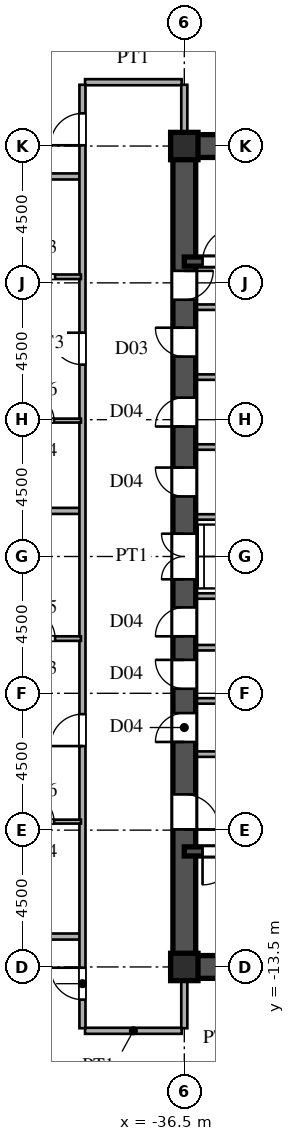
"""IFC4 building model, lengths in metres.
Left out: names, types, materials, properties, quantities, classifications, styles, units other than length and angle.
Written with IfcOpenShell. Run it as: python <this file> out.ifc"""

import sys

from ifc_helpers import new_model, si_unit, direction, frame, frame_2d, origin, origin_2d, place, context, subcontext, project, spatial, rectangle, i_section, extrude, source, transform, mapped, element, fill, save


model = new_model("IFC4")
c1 = context("Model", 3, precision=1e-05, world=origin(), true_north=direction((0.0, 1.0)))
c2 = subcontext(c1, "Body", "Model", "MODEL_VIEW")
j1 = project(units=[si_unit("LENGTHUNIT", "METRE"), si_unit("PLANEANGLEUNIT", "RADIAN")], contexts=[c1])
p1 = place(None, origin())
s1 = spatial("IfcSite", under=j1, at=p1, CompositionType="ELEMENT")
p2 = place(p1, origin())
s2 = spatial("IfcBuilding", under=s1, at=p2, CompositionType="ELEMENT")
p3 = place(p2, frame((0.0, 0.0, 54.9)))
s3 = spatial("IfcBuildingStorey", under=s2, at=p3, CompositionType="ELEMENT", Elevation=54.9)
m1 = source(origin(), c2, "Body", "SweptSolid", [
    extrude(i_section(OverallWidth=0.9, OverallDepth=0.9, WebThickness=0.036, FlangeThickness=0.055, at=origin_2d()), origin(), (0.0, 0.0, 1.0), 3.6),
])
for number, where, z_axis, x_axis in (
    (1, (-36.5, -13.5, 0.0), (0.0, 0.0, 1.0), (1.0, 0.0, 0.0)),
    (2, (-36.5, 13.5, 0.0), (0.0, 0.0, 1.0), (1.0, 0.0, 0.0)),
):
    element("IfcColumn", number, at=place(p3, frame(where, z_axis=z_axis, x_axis=x_axis)), inside=s3, PredefinedType="COLUMN", context=c2, shape_type="MappedRepresentation", body=[
        mapped(m1, transform((0.0, 0.0, 0.0), scale=1.0)),
    ])
for number, where, z_axis, x_axis in (
    (3, (-36.5, -13.5, 0.0), (0.0, 0.0, 1.0), (1.0, 0.0, 0.0)),
    (4, (-36.5, 13.5, 0.0), (0.0, 0.0, 1.0), (1.0, 0.0, 0.0)),
):
    element("IfcWall", number, at=place(p3, frame(where, z_axis=z_axis, x_axis=x_axis)), inside=s3, PredefinedType="SHEAR", context=c2, shape_type="SweptSolid", body=[
        extrude(rectangle(XDim=9.0, YDim=0.75, at=frame_2d((4.5, 0.0))), origin(), (0.0, 0.0, 1.0), 3.38),
    ])
p4 = place(p3, frame((-36.5, -13.65, 0.0), z_axis=(0.0, 0.0, 1.0), x_axis=(0.0, 1.0, 0.0)))
e5 = element("IfcWall", 5, at=p4, inside=s3, PredefinedType="SHEAR", context=c2, shape_type="SweptSolid", body=[
    extrude(rectangle(XDim=7.15, YDim=0.75, at=frame_2d((3.575, 0.0))), origin(), (0.0, 0.0, 1.0), 3.38),
])
p5 = place(p4, frame((4.675, 0.0, 0.0)))
e6 = element("IfcOpeningElement", 6, at=p5, cuts=e5, PredefinedType="OPENING", context=c2, shape_type="SweptSolid", body=[
    extrude(rectangle(XDim=1.15, YDim=2.2, at=frame_2d((0.575, 1.1))), frame((0.0, 0.385, 0.0), z_axis=(0.0, -1.0, 0.0), x_axis=(1.0, 0.0, 0.0)), (0.0, 0.0, 1.0), 0.77),
])
p6 = place(p3, frame((-36.5, -1.3, 0.0), z_axis=(0.0, 0.0, 1.0), x_axis=(0.0, 1.0, 0.0)))
e7 = element("IfcWall", 7, at=p6, inside=s3, PredefinedType="SHEAR", context=c2, shape_type="SweptSolid", body=[
    extrude(rectangle(XDim=2.6, YDim=0.75, at=frame_2d((1.3, 0.0))), origin(), (0.0, 0.0, 1.0), 3.38),
])
p7 = place(p6, frame((0.55, 0.0, 0.0)))
e8 = element("IfcOpeningElement", 8, at=p7, cuts=e7, PredefinedType="OPENING", context=c2, shape_type="SweptSolid", body=[
    extrude(rectangle(XDim=1.5, YDim=2.3, at=frame_2d((0.75, 1.15))), frame((0.0, 0.385, 0.0), z_axis=(0.0, -1.0, 0.0), x_axis=(1.0, 0.0, 0.0)), (0.0, 0.0, 1.0), 0.77),
])
p8 = place(p3, frame((-36.5, 8.2, 0.0), z_axis=(0.0, 0.0, 1.0), x_axis=(0.0, 1.0, 0.0)))
e9 = element("IfcWall", 9, at=p8, inside=s3, PredefinedType="SHEAR", context=c2, shape_type="SweptSolid", body=[
    extrude(rectangle(XDim=5.45, YDim=0.75, at=frame_2d((2.725, 0.0))), origin(), (0.0, 0.0, 1.0), 3.38),
])
p9 = place(p8, frame((0.245, 0.0, 0.0)))
e10 = element("IfcOpeningElement", 10, at=p9, cuts=e9, PredefinedType="OPENING", context=c2, shape_type="SweptSolid", body=[
    extrude(rectangle(XDim=0.95, YDim=2.15, at=frame_2d((0.475, 1.075))), frame((0.0, 0.385, 0.0), z_axis=(0.0, -1.0, 0.0), x_axis=(1.0, 0.0, 0.0)), (0.0, 0.0, 1.0), 0.77),
])
p10 = place(p3, frame((-36.5, -6.5, 0.0), z_axis=(0.0, 0.0, 1.0), x_axis=(0.0, 1.0, 0.0)))
e11 = element("IfcWall", 11, at=p10, inside=s3, PredefinedType="SHEAR", context=c2, shape_type="SweptSolid", body=[
    extrude(rectangle(XDim=1.75, YDim=0.75, at=frame_2d((0.875, 0.0))), origin(), (0.0, 0.0, 1.0), 3.38),
])
p11 = place(p10, frame((0.4, 0.0, 0.0)))
e12 = element("IfcOpeningElement", 12, at=p11, cuts=e11, PredefinedType="OPENING", context=c2, shape_type="SweptSolid", body=[
    extrude(rectangle(XDim=0.95, YDim=2.15, at=frame_2d((0.475, 1.075))), frame((0.0, 0.385, 0.0), z_axis=(0.0, -1.0, 0.0), x_axis=(1.0, 0.0, 0.0)), (0.0, 0.0, 1.0), 0.77),
])
p12 = place(p3, frame((-36.5, -4.75, 0.0), z_axis=(0.0, 0.0, 1.0), x_axis=(0.0, 1.0, 0.0)))
e13 = element("IfcWall", 13, at=p12, inside=s3, PredefinedType="SHEAR", context=c2, shape_type="SweptSolid", body=[
    extrude(rectangle(XDim=1.75, YDim=0.75, at=frame_2d((0.875, 0.0))), origin(), (0.0, 0.0, 1.0), 3.38),
])
p13 = place(p12, frame((0.4, 0.0, 0.0)))
e14 = element("IfcOpeningElement", 14, at=p13, cuts=e13, PredefinedType="OPENING", context=c2, shape_type="SweptSolid", body=[
    extrude(rectangle(XDim=0.95, YDim=2.15, at=frame_2d((0.475, 1.075))), frame((0.0, 0.385, 0.0), z_axis=(0.0, -1.0, 0.0), x_axis=(1.0, 0.0, 0.0)), (0.0, 0.0, 1.0), 0.77),
])
p14 = place(p3, frame((-36.5, -3.0, 0.0), z_axis=(0.0, 0.0, 1.0), x_axis=(0.0, 1.0, 0.0)))
e15 = element("IfcWall", 15, at=p14, inside=s3, PredefinedType="SHEAR", context=c2, shape_type="SweptSolid", body=[
    extrude(rectangle(XDim=1.7, YDim=0.75, at=frame_2d((0.85, 0.0))), origin(), (0.0, 0.0, 1.0), 3.38),
])
p15 = place(p14, frame((0.375, 0.0, 0.0)))
e16 = element("IfcOpeningElement", 16, at=p15, cuts=e15, PredefinedType="OPENING", context=c2, shape_type="SweptSolid", body=[
    extrude(rectangle(XDim=0.95, YDim=2.15, at=frame_2d((0.475, 1.075))), frame((0.0, 0.385, 0.0), z_axis=(0.0, -1.0, 0.0), x_axis=(1.0, 0.0, 0.0)), (0.0, 0.0, 1.0), 0.77),
])
p16 = place(p3, frame((-36.5, 1.3, 0.0), z_axis=(0.0, 0.0, 1.0), x_axis=(0.0, 1.0, 0.0)))
e17 = element("IfcWall", 17, at=p16, inside=s3, PredefinedType="SHEAR", context=c2, shape_type="SweptSolid", body=[
    extrude(rectangle(XDim=2.3, YDim=0.75, at=frame_2d((1.15, 0.0))), origin(), (0.0, 0.0, 1.0), 3.38),
])
p17 = place(p16, frame((0.675, 0.0, 0.0)))
e18 = element("IfcOpeningElement", 18, at=p17, cuts=e17, PredefinedType="OPENING", context=c2, shape_type="SweptSolid", body=[
    extrude(rectangle(XDim=0.95, YDim=2.15, at=frame_2d((0.475, 1.075))), frame((0.0, 0.385, 0.0), z_axis=(0.0, -1.0, 0.0), x_axis=(1.0, 0.0, 0.0)), (0.0, 0.0, 1.0), 0.77),
])
p18 = place(p3, frame((-36.5, 3.6, 0.0), z_axis=(0.0, 0.0, 1.0), x_axis=(0.0, 1.0, 0.0)))
e19 = element("IfcWall", 19, at=p18, inside=s3, PredefinedType="SHEAR", context=c2, shape_type="SweptSolid", body=[
    extrude(rectangle(XDim=2.3, YDim=0.75, at=frame_2d((1.15, 0.0))), origin(), (0.0, 0.0, 1.0), 3.38),
])
p19 = place(p18, frame((0.675, 0.0, 0.0)))
e20 = element("IfcOpeningElement", 20, at=p19, cuts=e19, PredefinedType="OPENING", context=c2, shape_type="SweptSolid", body=[
    extrude(rectangle(XDim=0.95, YDim=2.15, at=frame_2d((0.475, 1.075))), frame((0.0, 0.385, 0.0), z_axis=(0.0, -1.0, 0.0), x_axis=(1.0, 0.0, 0.0)), (0.0, 0.0, 1.0), 0.77),
])
p20 = place(p3, frame((-36.5, 5.9, 0.0), z_axis=(0.0, 0.0, 1.0), x_axis=(0.0, 1.0, 0.0)))
e21 = element("IfcWall", 21, at=p20, inside=s3, PredefinedType="SHEAR", context=c2, shape_type="SweptSolid", body=[
    extrude(rectangle(XDim=2.3, YDim=0.75, at=frame_2d((1.15, 0.0))), origin(), (0.0, 0.0, 1.0), 3.38),
])
p21 = place(p20, frame((0.675, 0.0, 0.0)))
e22 = element("IfcOpeningElement", 22, at=p21, cuts=e21, PredefinedType="OPENING", context=c2, shape_type="SweptSolid", body=[
    extrude(rectangle(XDim=0.95, YDim=2.15, at=frame_2d((0.475, 1.075))), frame((0.0, 0.385, 0.0), z_axis=(0.0, -1.0, 0.0), x_axis=(1.0, 0.0, 0.0)), (0.0, 0.0, 1.0), 0.77),
])
p22 = place(p3, frame((-36.5, -9.7, 0.0), z_axis=(0.0, 0.0, 1.0), x_axis=(1.0, 0.0, 0.0)))
e23 = element("IfcWall", 23, at=p22, inside=s3, PredefinedType="SHEAR", context=c2, shape_type="SweptSolid", body=[
    extrude(rectangle(XDim=9.0, YDim=0.3, at=frame_2d((4.5, 0.0))), origin(), (0.0, 0.0, 1.0), 3.38),
])
p23 = place(p22, frame((0.6, 0.0, 0.0)))
e24 = element("IfcOpeningElement", 24, at=p23, cuts=e23, PredefinedType="OPENING", context=c2, shape_type="SweptSolid", body=[
    extrude(rectangle(XDim=1.1, YDim=2.2, at=frame_2d((0.55, 1.1))), frame((0.0, 0.16, 0.0), z_axis=(0.0, -1.0, 0.0), x_axis=(1.0, 0.0, 0.0)), (0.0, 0.0, 1.0), 0.32),
])
p24 = place(p3, frame((-36.5, 9.7, 0.0), z_axis=(0.0, 0.0, 1.0), x_axis=(1.0, 0.0, 0.0)))
e25 = element("IfcWall", 25, at=p24, inside=s3, PredefinedType="SHEAR", context=c2, shape_type="SweptSolid", body=[
    extrude(rectangle(XDim=9.0, YDim=0.3, at=frame_2d((4.5, 0.0))), origin(), (0.0, 0.0, 1.0), 3.38),
])
p25 = place(p24, frame((0.6, 0.0, 0.0)))
e26 = element("IfcOpeningElement", 26, at=p25, cuts=e25, PredefinedType="OPENING", context=c2, shape_type="SweptSolid", body=[
    extrude(rectangle(XDim=1.1, YDim=2.2, at=frame_2d((0.55, 1.1))), frame((0.0, 0.16, 0.0), z_axis=(0.0, -1.0, 0.0), x_axis=(1.0, 0.0, 0.0)), (0.0, 0.0, 1.0), 0.32),
])
for number, where, z_axis, x_axis in (
    (27, (-36.15, -6.5, 0.0), (0.0, 0.0, 1.0), (1.0, 0.0, 0.0)),
    (28, (-36.15, 8.2, 0.0), (0.0, 0.0, 1.0), (1.0, 0.0, 0.0)),
):
    element("IfcWall", number, at=place(p3, frame(where, z_axis=z_axis, x_axis=x_axis)), inside=s3, PredefinedType="PARTITIONING", context=c2, shape_type="SweptSolid", body=[
        extrude(rectangle(XDim=5.7, YDim=0.18, at=frame_2d((2.85, 0.0))), origin(), (0.0, 0.0, 1.0), 3.38),
    ])
for number, where, z_axis, x_axis in (
    (29, (-36.15, -1.3, 0.0), (0.0, 0.0, 1.0), (1.0, 0.0, 0.0)),
    (30, (-36.15, 1.3, 0.0), (0.0, 0.0, 1.0), (1.0, 0.0, 0.0)),
    (31, (-36.15, -4.75, 0.0), (0.0, 0.0, 1.0), (1.0, 0.0, 0.0)),
    (32, (-36.15, -3.0, 0.0), (0.0, 0.0, 1.0), (1.0, 0.0, 0.0)),
    (33, (-36.15, 3.6, 0.0), (0.0, 0.0, 1.0), (1.0, 0.0, 0.0)),
    (34, (-36.15, 5.9, 0.0), (0.0, 0.0, 1.0), (1.0, 0.0, 0.0)),
):
    element("IfcWall", number, at=place(p3, frame(where, z_axis=z_axis, x_axis=x_axis)), inside=s3, PredefinedType="PARTITIONING", context=c2, shape_type="SweptSolid", body=[
        extrude(rectangle(XDim=2.95, YDim=0.18, at=frame_2d((1.475, 0.0))), origin(), (0.0, 0.0, 1.0), 3.38),
    ])
p26 = place(p3, frame((-39.765, -15.6, 0.0), z_axis=(0.0, 0.0, 1.0), x_axis=(1.0, 0.0, 0.0)))
e35 = element("IfcWall", 35, at=p26, inside=s3, PredefinedType="PARTITIONING", context=c2, shape_type="SweptSolid", body=[
    extrude(rectangle(XDim=3.18, YDim=0.2, at=frame_2d((1.59, 0.0))), origin(), (0.0, 0.0, 1.0), 3.38),
])
p27 = place(p3, frame((-66.337, -12.5, 0.0), z_axis=(0.0, 0.0, 1.0), x_axis=(1.0, 0.0, 0.0)))
e36 = element("IfcWall", 36, at=p27, inside=s3, PredefinedType="PARTITIONING", context=c2, shape_type="SweptSolid", body=[
    extrude(rectangle(XDim=26.407, YDim=0.2, at=frame_2d((13.204, 0.0))), origin(), (0.0, 0.0, 1.0), 3.38),
])
p28 = place(p3, frame((-42.55, -8.72, 0.0), z_axis=(0.0, 0.0, 1.0), x_axis=(1.0, 0.0, 0.0)))
e37 = element("IfcWall", 37, at=p28, inside=s3, PredefinedType="PARTITIONING", context=c2, shape_type="SweptSolid", body=[
    extrude(rectangle(XDim=2.65, YDim=0.13, at=frame_2d((1.325, 0.0))), origin(), (0.0, 0.0, 1.0), 3.38),
])
p29 = place(p28, frame((0.885, 0.0, 0.0)))
e38 = element("IfcOpeningElement", 38, at=p29, cuts=e37, PredefinedType="OPENING", context=c2, shape_type="SweptSolid", body=[
    extrude(rectangle(XDim=0.88, YDim=2.1, at=frame_2d((0.44, 1.05))), frame((0.0, 0.075, 0.0), z_axis=(0.0, -1.0, 0.0), x_axis=(1.0, 0.0, 0.0)), (0.0, 0.0, 1.0), 0.15),
])
p30 = place(p3, frame((-42.55, -2.7, 0.0), z_axis=(0.0, 0.0, 1.0), x_axis=(1.0, 0.0, 0.0)))
e39 = element("IfcWall", 39, at=p30, inside=s3, PredefinedType="PARTITIONING", context=c2, shape_type="SweptSolid", body=[
    extrude(rectangle(XDim=2.65, YDim=0.15, at=frame_2d((1.325, 0.0))), origin(), (0.0, 0.0, 1.0), 3.38),
])
p31 = place(p30, frame((0.85, 0.0, 0.0)))
e40 = element("IfcOpeningElement", 40, at=p31, cuts=e39, PredefinedType="OPENING", context=c2, shape_type="SweptSolid", body=[
    extrude(rectangle(XDim=0.95, YDim=2.15, at=frame_2d((0.475, 1.075))), frame((0.0, 0.085, 0.0), z_axis=(0.0, -1.0, 0.0), x_axis=(1.0, 0.0, 0.0)), (0.0, 0.0, 1.0), 0.17),
])
p32 = place(p3, frame((-72.505, 1.5, 0.0), z_axis=(0.0, 0.0, 1.0), x_axis=(1.0, 0.0, 0.0)))
e41 = element("IfcWall", 41, at=p32, inside=s3, PredefinedType="PARTITIONING", context=c2, shape_type="SweptSolid", body=[
    extrude(rectangle(XDim=32.575, YDim=0.2, at=frame_2d((16.288, 0.0))), origin(), (0.0, 0.0, 1.0), 3.38),
])
p33 = place(p3, frame((-42.55, 4.47, 0.0), z_axis=(0.0, 0.0, 1.0), x_axis=(1.0, 0.0, 0.0)))
e42 = element("IfcWall", 42, at=p33, inside=s3, PredefinedType="PARTITIONING", context=c2, shape_type="SweptSolid", body=[
    extrude(rectangle(XDim=2.65, YDim=0.13, at=frame_2d((1.325, 0.0))), origin(), (0.0, 0.0, 1.0), 2.68),
])
p34 = place(p33, frame((0.885, 0.0, 0.0)))
e43 = element("IfcOpeningElement", 43, at=p34, cuts=e42, PredefinedType="OPENING", context=c2, shape_type="SweptSolid", body=[
    extrude(rectangle(XDim=0.88, YDim=2.1, at=frame_2d((0.44, 1.05))), frame((0.0, 0.075, 0.0), z_axis=(0.0, -1.0, 0.0), x_axis=(1.0, 0.0, 0.0)), (0.0, 0.0, 1.0), 0.15),
])
p35 = place(p3, frame((-42.55, 9.2, 0.0), z_axis=(0.0, 0.0, 1.0), x_axis=(1.0, 0.0, 0.0)))
e44 = element("IfcWall", 44, at=p35, inside=s3, PredefinedType="PARTITIONING", context=c2, shape_type="SweptSolid", body=[
    extrude(rectangle(XDim=2.65, YDim=0.15, at=frame_2d((1.325, 0.0))), origin(), (0.0, 0.0, 1.0), 3.38),
])
p36 = place(p35, frame((0.85, 0.0, 0.0)))
e45 = element("IfcOpeningElement", 45, at=p36, cuts=e44, PredefinedType="OPENING", context=c2, shape_type="SweptSolid", body=[
    extrude(rectangle(XDim=0.95, YDim=2.15, at=frame_2d((0.475, 1.075))), frame((0.0, 0.085, 0.0), z_axis=(0.0, -1.0, 0.0), x_axis=(1.0, 0.0, 0.0)), (0.0, 0.0, 1.0), 0.17),
])
p37 = place(p3, frame((-66.337, 12.5, 0.0), z_axis=(0.0, 0.0, 1.0), x_axis=(1.0, 0.0, 0.0)))
e46 = element("IfcWall", 46, at=p37, inside=s3, PredefinedType="PARTITIONING", context=c2, shape_type="SweptSolid", body=[
    extrude(rectangle(XDim=26.407, YDim=0.2, at=frame_2d((13.204, 0.0))), origin(), (0.0, 0.0, 1.0), 3.38),
])
p38 = place(p3, frame((-39.765, 15.6, 0.0), z_axis=(0.0, 0.0, 1.0), x_axis=(1.0, 0.0, 0.0)))
e47 = element("IfcWall", 47, at=p38, inside=s3, PredefinedType="PARTITIONING", context=c2, shape_type="SweptSolid", body=[
    extrude(rectangle(XDim=3.18, YDim=0.2, at=frame_2d((1.59, 0.0))), origin(), (0.0, 0.0, 1.0), 3.38),
])
p39 = place(p3, frame((-39.85, -15.515, 0.0), z_axis=(0.0, 0.0, 1.0), x_axis=(0.0, 1.0, 0.0)))
e48 = element("IfcWall", 48, at=p39, inside=s3, PredefinedType="PARTITIONING", context=c2, shape_type="SweptSolid", body=[
    extrude(rectangle(XDim=31.03, YDim=0.2, at=frame_2d((15.515, 0.0))), origin(), (0.0, 0.0, 1.0), 3.38),
])
p40 = place(p39, frame((0.94, 0.0, 0.0)))
e49 = element("IfcOpeningElement", 49, at=p40, cuts=e48, PredefinedType="OPENING", context=c2, shape_type="SweptSolid", body=[
    extrude(rectangle(XDim=1.05, YDim=2.25, at=frame_2d((0.525, 1.125))), frame((0.0, 0.11, 0.0), z_axis=(0.0, -1.0, 0.0), x_axis=(1.0, 0.0, 0.0)), (0.0, 0.0, 1.0), 0.22),
])
p41 = place(p39, frame((9.28, 0.0, 0.0)))
e50 = element("IfcOpeningElement", 50, at=p41, cuts=e48, PredefinedType="OPENING", context=c2, shape_type="SweptSolid", body=[
    extrude(rectangle(XDim=1.05, YDim=2.25, at=frame_2d((0.525, 1.125))), frame((0.0, 0.11, 0.0), z_axis=(0.0, -1.0, 0.0), x_axis=(1.0, 0.0, 0.0)), (0.0, 0.0, 1.0), 0.22),
])
p42 = place(p39, frame((21.825, 0.0, 0.0)))
e51 = element("IfcOpeningElement", 51, at=p42, cuts=e48, PredefinedType="OPENING", context=c2, shape_type="SweptSolid", body=[
    extrude(rectangle(XDim=1.05, YDim=2.25, at=frame_2d((0.525, 1.125))), frame((0.0, 0.11, 0.0), z_axis=(0.0, -1.0, 0.0), x_axis=(1.0, 0.0, 0.0)), (0.0, 0.0, 1.0), 0.22),
])
p43 = place(p39, frame((29.04, 0.0, 0.0)))
e52 = element("IfcOpeningElement", 52, at=p43, cuts=e48, PredefinedType="OPENING", context=c2, shape_type="SweptSolid", body=[
    extrude(rectangle(XDim=1.05, YDim=2.25, at=frame_2d((0.525, 1.125))), frame((0.0, 0.11, 0.0), z_axis=(0.0, -1.0, 0.0), x_axis=(1.0, 0.0, 0.0)), (0.0, 0.0, 1.0), 0.22),
])
for number, where, z_axis, x_axis in (
    (53, (-36.5, -15.515, 0.0), (0.0, 0.0, 1.0), (0.0, 1.0, 0.0)),
    (54, (-36.5, 13.88, 0.0), (0.0, 0.0, 1.0), (0.0, 1.0, 0.0)),
):
    element("IfcWall", number, at=place(p3, frame(where, z_axis=z_axis, x_axis=x_axis)), inside=s3, PredefinedType="PARTITIONING", context=c2, shape_type="SweptSolid", body=[
        extrude(rectangle(XDim=1.635, YDim=0.2, at=frame_2d((0.817, 0.0))), origin(), (0.0, 0.0, 1.0), 2.68),
    ])
m2 = source(origin(), c2, "Body", "SweptSolid", [
    extrude(rectangle(XDim=1.15, YDim=2.2, at=frame_2d((0.575, 1.1))), frame((0.0, 0.025, 0.0), z_axis=(0.0, -1.0, 0.0), x_axis=(1.0, 0.0, 0.0)), (0.0, 0.0, 1.0), 0.05),
])
p44 = place(p5, frame((1.15, 0.0, 0.0), z_axis=(0.0, 0.0, 1.0), x_axis=(-1.0, 0.0, 0.0)))
e55 = element("IfcDoor", 55, at=p44, inside=s3, OperationType="SINGLE_SWING_LEFT", PredefinedType="DOOR", context=c2, shape_type="MappedRepresentation", body=[
    mapped(m2, transform((0.0, 0.0, 0.0), scale=1.0)),
])
fill(e6, e55)
m3 = source(origin(), c2, "Body", "SweptSolid", [
    extrude(rectangle(XDim=1.5, YDim=2.3, at=frame_2d((0.75, 1.15))), frame((0.0, 0.025, 0.0), z_axis=(0.0, -1.0, 0.0), x_axis=(1.0, 0.0, 0.0)), (0.0, 0.0, 1.0), 0.05),
])
p45 = place(p7, origin())
e56 = element("IfcDoor", 56, at=p45, inside=s3, OperationType="DOUBLE_SWING_LEFT", PredefinedType="DOOR", context=c2, shape_type="MappedRepresentation", body=[
    mapped(m3, transform((0.0, 0.0, 0.0), scale=1.0)),
])
fill(e8, e56)
m4 = source(origin(), c2, "Body", "SweptSolid", [
    extrude(rectangle(XDim=0.95, YDim=2.15, at=frame_2d((0.475, 1.075))), frame((0.0, 0.025, 0.0), z_axis=(0.0, -1.0, 0.0), x_axis=(1.0, 0.0, 0.0)), (0.0, 0.0, 1.0), 0.05),
])
p46 = place(p9, frame((0.95, 0.0, 0.0), z_axis=(0.0, 0.0, 1.0), x_axis=(-1.0, 0.0, 0.0)))
e57 = element("IfcDoor", 57, at=p46, inside=s3, OperationType="SINGLE_SWING_RIGHT", PredefinedType="DOOR", context=c2, shape_type="MappedRepresentation", body=[
    mapped(m4, transform((0.0, 0.0, 0.0), scale=1.0)),
])
fill(e10, e57)
p47 = place(p11, origin())
e58 = element("IfcDoor", 58, at=p47, inside=s3, OperationType="SINGLE_SWING_LEFT", PredefinedType="DOOR", context=c2, shape_type="MappedRepresentation", body=[
    mapped(m4, transform((0.0, 0.0, 0.0), scale=1.0)),
])
fill(e12, e58)
p48 = place(p13, origin())
e59 = element("IfcDoor", 59, at=p48, inside=s3, OperationType="SINGLE_SWING_RIGHT", PredefinedType="DOOR", context=c2, shape_type="MappedRepresentation", body=[
    mapped(m4, transform((0.0, 0.0, 0.0), scale=1.0)),
])
fill(e14, e59)
p49 = place(p15, origin())
e60 = element("IfcDoor", 60, at=p49, inside=s3, OperationType="SINGLE_SWING_LEFT", PredefinedType="DOOR", context=c2, shape_type="MappedRepresentation", body=[
    mapped(m4, transform((0.0, 0.0, 0.0), scale=1.0)),
])
fill(e16, e60)
p50 = place(p17, origin())
e61 = element("IfcDoor", 61, at=p50, inside=s3, OperationType="SINGLE_SWING_RIGHT", PredefinedType="DOOR", context=c2, shape_type="MappedRepresentation", body=[
    mapped(m4, transform((0.0, 0.0, 0.0), scale=1.0)),
])
fill(e18, e61)
p51 = place(p19, origin())
e62 = element("IfcDoor", 62, at=p51, inside=s3, OperationType="SINGLE_SWING_LEFT", PredefinedType="DOOR", context=c2, shape_type="MappedRepresentation", body=[
    mapped(m4, transform((0.0, 0.0, 0.0), scale=1.0)),
])
fill(e20, e62)
p52 = place(p21, origin())
e63 = element("IfcDoor", 63, at=p52, inside=s3, OperationType="SINGLE_SWING_RIGHT", PredefinedType="DOOR", context=c2, shape_type="MappedRepresentation", body=[
    mapped(m4, transform((0.0, 0.0, 0.0), scale=1.0)),
])
fill(e22, e63)
m5 = source(origin(), c2, "Body", "SweptSolid", [
    extrude(rectangle(XDim=1.1, YDim=2.2, at=frame_2d((0.55, 1.1))), frame((0.0, 0.025, 0.0), z_axis=(0.0, -1.0, 0.0), x_axis=(1.0, 0.0, 0.0)), (0.0, 0.0, 1.0), 0.05),
])
p53 = place(p23, frame((1.1, 0.0, 0.0), z_axis=(0.0, 0.0, 1.0), x_axis=(-1.0, 0.0, 0.0)))
e64 = element("IfcDoor", 64, at=p53, inside=s3, OperationType="SINGLE_SWING_LEFT", PredefinedType="DOOR", context=c2, shape_type="MappedRepresentation", body=[
    mapped(m5, transform((0.0, 0.0, 0.0), scale=1.0)),
])
fill(e24, e64)
p54 = place(p25, origin())
e65 = element("IfcDoor", 65, at=p54, inside=s3, OperationType="SINGLE_SWING_RIGHT", PredefinedType="DOOR", context=c2, shape_type="MappedRepresentation", body=[
    mapped(m5, transform((0.0, 0.0, 0.0), scale=1.0)),
])
fill(e26, e65)
m6 = source(origin(), c2, "Body", "SweptSolid", [
    extrude(rectangle(XDim=0.88, YDim=2.1, at=frame_2d((0.44, 1.05))), frame((0.0, 0.025, 0.0), z_axis=(0.0, -1.0, 0.0), x_axis=(1.0, 0.0, 0.0)), (0.0, 0.0, 1.0), 0.05),
])
p55 = place(p29, origin())
e66 = element("IfcDoor", 66, at=p55, inside=s3, OperationType="SINGLE_SWING_LEFT", PredefinedType="DOOR", context=c2, shape_type="MappedRepresentation", body=[
    mapped(m6, transform((0.0, 0.0, 0.0), scale=1.0)),
])
fill(e38, e66)
m7 = source(origin(), c2, "Body", "SweptSolid", [
    extrude(rectangle(XDim=0.95, YDim=2.15, at=frame_2d((0.475, 1.075))), frame((0.0, 0.025, 0.0), z_axis=(0.0, -1.0, 0.0), x_axis=(1.0, 0.0, 0.0)), (0.0, 0.0, 1.0), 0.05),
])
p56 = place(p31, origin())
e67 = element("IfcDoor", 67, at=p56, inside=s3, OperationType="SINGLE_SWING_LEFT", PredefinedType="DOOR", context=c2, shape_type="MappedRepresentation", body=[
    mapped(m7, transform((0.0, 0.0, 0.0), scale=1.0)),
])
fill(e40, e67)
p57 = place(p34, origin())
e68 = element("IfcDoor", 68, at=p57, inside=s3, OperationType="SINGLE_SWING_LEFT", PredefinedType="DOOR", context=c2, shape_type="MappedRepresentation", body=[
    mapped(m6, transform((0.0, 0.0, 0.0), scale=1.0)),
])
fill(e43, e68)
m8 = source(origin(), c2, "Body", "SweptSolid", [
    extrude(rectangle(XDim=1.05, YDim=2.25, at=frame_2d((0.525, 1.125))), frame((0.0, 0.025, 0.0), z_axis=(0.0, -1.0, 0.0), x_axis=(1.0, 0.0, 0.0)), (0.0, 0.0, 1.0), 0.05),
])
p58 = place(p40, origin())
e69 = element("IfcDoor", 69, at=p58, inside=s3, OperationType="SINGLE_SWING_RIGHT", PredefinedType="DOOR", context=c2, shape_type="MappedRepresentation", body=[
    mapped(m8, transform((0.0, 0.0, 0.0), scale=1.0)),
])
fill(e49, e69)
p59 = place(p41, origin())
e70 = element("IfcDoor", 70, at=p59, inside=s3, OperationType="SINGLE_SWING_LEFT", PredefinedType="DOOR", context=c2, shape_type="MappedRepresentation", body=[
    mapped(m8, transform((0.0, 0.0, 0.0), scale=1.0)),
])
fill(e50, e70)
p60 = place(p42, origin())
e71 = element("IfcDoor", 71, at=p60, inside=s3, OperationType="SINGLE_SWING_RIGHT", PredefinedType="DOOR", context=c2, shape_type="MappedRepresentation", body=[
    mapped(m8, transform((0.0, 0.0, 0.0), scale=1.0)),
])
fill(e51, e71)
p61 = place(p43, origin())
e72 = element("IfcDoor", 72, at=p61, inside=s3, OperationType="SINGLE_SWING_LEFT", PredefinedType="DOOR", context=c2, shape_type="MappedRepresentation", body=[
    mapped(m8, transform((0.0, 0.0, 0.0), scale=1.0)),
])
fill(e52, e72)
save(model, sys.argv[1])
